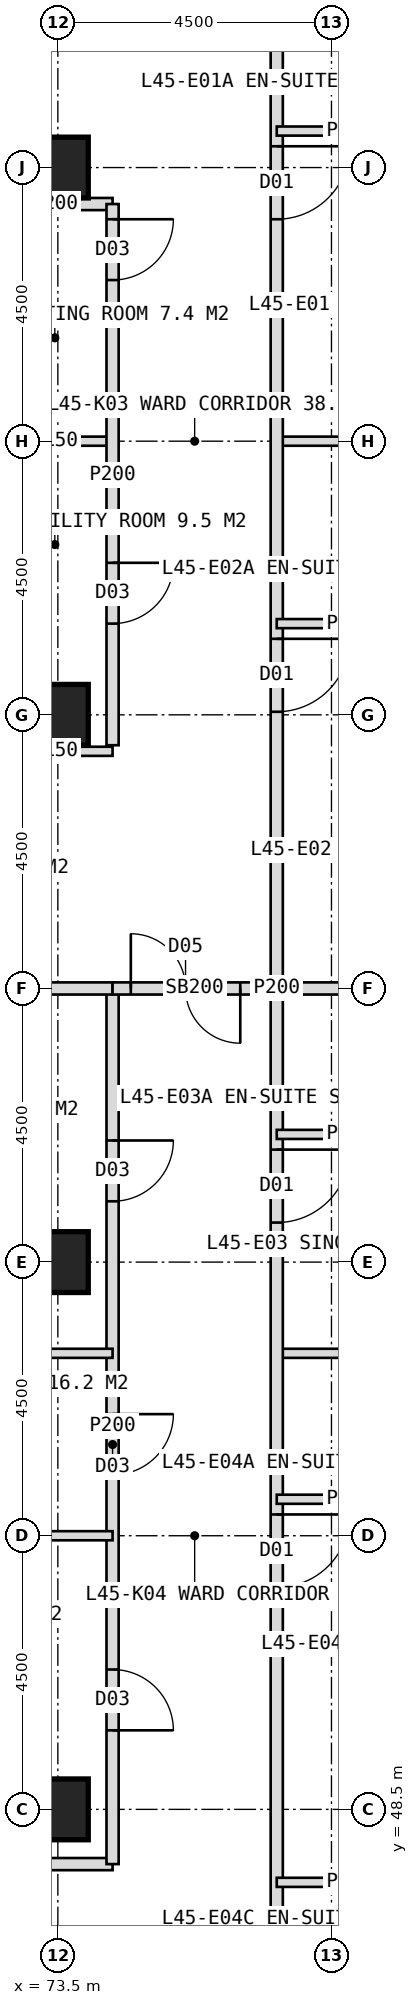
"""IFC4 building model, lengths in metres.
Left out: names, types, materials, properties, quantities, classifications, styles, units other than length and angle.
Written with IfcOpenShell. Run it as: python <this file> out.ifc"""

import sys

from ifc_helpers import new_model, si_unit, direction, frame, frame_2d, origin, origin_2d, place, context, subcontext, project, spatial, rectangle, hollow_rectangle, extrude, element, fill, save


model = new_model("IFC4")
c1 = context("Model", 3, precision=1e-05, world=origin(), true_north=direction((0.0, 1.0)))
c2 = subcontext(c1, "Body", "Model", "MODEL_VIEW")
j1 = project(units=[si_unit("LENGTHUNIT", "METRE"), si_unit("PLANEANGLEUNIT", "RADIAN")], contexts=[c1])
p1 = place(None, origin())
s1 = spatial("IfcSite", under=j1, at=p1, CompositionType="ELEMENT")
p2 = place(p1, origin())
s2 = spatial("IfcBuilding", under=s1, at=p2, CompositionType="ELEMENT")
p3 = place(p2, frame((0.0, 0.0, 189.0)))
s3 = spatial("IfcBuildingStorey", under=s2, at=p3, CompositionType="ELEMENT", Elevation=189.0)
for number, where, z_axis, x_axis in (
    (1, (73.5, 48.5, 0.0), (0.0, 0.0, 1.0), (1.0, 0.0, 0.0)),
    (2, (73.5, 75.5, 0.0), (0.0, 0.0, 1.0), (1.0, 0.0, 0.0)),
    (3, (73.5, 57.5, 0.0), (0.0, 0.0, 1.0), (1.0, 0.0, 0.0)),
    (4, (73.5, 66.5, 0.0), (0.0, 0.0, 1.0), (1.0, 0.0, 0.0)),
):
    element("IfcColumn", number, at=place(p3, frame(where, z_axis=z_axis, x_axis=x_axis)), inside=s3, PredefinedType="COLUMN", context=c2, shape_type="SweptSolid", body=[
        extrude(hollow_rectangle(XDim=1.0, YDim=1.0, WallThickness=0.1, at=origin_2d()), origin(), (0.0, 0.0, 1.0), 4.0),
    ])
p4 = place(p3, frame((72.5, 74.9, 0.0), z_axis=(0.0, 0.0, 1.0), x_axis=(1.0, 0.0, 0.0)))
e5 = element("IfcWall", 5, at=p4, inside=s3, PredefinedType="PARTITIONING", context=c2, shape_type="SweptSolid", body=[
    extrude(rectangle(XDim=1.9, YDim=0.2, at=frame_2d((0.95, 0.0))), origin(), (0.0, 0.0, 1.0), 3.75),
])
p5 = place(p3, frame((74.4, 47.6, 0.0), z_axis=(0.0, 0.0, 1.0), x_axis=(-1.0, 0.0, 0.0)))
e6 = element("IfcWall", 6, at=p5, inside=s3, PredefinedType="PARTITIONING", context=c2, shape_type="SweptSolid", body=[
    extrude(rectangle(XDim=5.4, YDim=0.2, at=frame_2d((2.7, 0.0))), origin(), (0.0, 0.0, 1.0), 3.75),
])
p6 = place(p3, frame((77.1, 71.0, 0.0), z_axis=(0.0, 0.0, 1.0), x_axis=(1.0, 0.0, 0.0)))
e7 = element("IfcWall", 7, at=p6, inside=s3, PredefinedType="PARTITIONING", context=c2, shape_type="SweptSolid", body=[
    extrude(rectangle(XDim=5.25, YDim=0.15, at=frame_2d((2.625, 0.0))), origin(), (0.0, 0.0, 1.0), 3.75),
])
p7 = place(p3, frame((77.1, 62.0, 0.0), z_axis=(0.0, 0.0, 1.0), x_axis=(1.0, 0.0, 0.0)))
e8 = element("IfcWall", 8, at=p7, inside=s3, PredefinedType="SOLIDWALL", context=c2, shape_type="SweptSolid", body=[
    extrude(rectangle(XDim=5.25, YDim=0.2, at=frame_2d((2.625, 0.0))), origin(), (0.0, 0.0, 1.0), 2.95),
])
p8 = place(p3, frame((77.1, 56.0, 0.0), z_axis=(0.0, 0.0, 1.0), x_axis=(1.0, 0.0, 0.0)))
e9 = element("IfcWall", 9, at=p8, inside=s3, PredefinedType="PARTITIONING", context=c2, shape_type="SweptSolid", body=[
    extrude(rectangle(XDim=5.25, YDim=0.15, at=frame_2d((2.625, 0.0))), origin(), (0.0, 0.0, 1.0), 3.75),
])
p9 = place(p3, frame((77.1, 79.1, 0.0), z_axis=(0.0, 0.0, 1.0), x_axis=(0.0, -1.0, 0.0)))
e10 = element("IfcWall", 10, at=p9, inside=s3, PredefinedType="PARTITIONING", context=c2, shape_type="SweptSolid", body=[
    extrude(rectangle(XDim=34.2, YDim=0.2, at=frame_2d((17.1, 0.0))), origin(), (0.0, 0.0, 1.0), 3.75),
])
p10 = place(p9, frame((3.25, 0.0, 0.0)))
e11 = element("IfcOpeningElement", 11, at=p10, cuts=e10, PredefinedType="OPENING", context=c2, shape_type="SweptSolid", body=[
    extrude(rectangle(XDim=1.2, YDim=2.2, at=frame_2d((0.6, 1.1))), frame((0.0, 0.11, 0.0), z_axis=(0.0, -1.0, 0.0), x_axis=(1.0, 0.0, 0.0)), (0.0, 0.0, 1.0), 0.22),
])
p11 = place(p9, frame((11.35, 0.0, 0.0)))
e12 = element("IfcOpeningElement", 12, at=p11, cuts=e10, PredefinedType="OPENING", context=c2, shape_type="SweptSolid", body=[
    extrude(rectangle(XDim=1.2, YDim=2.2, at=frame_2d((0.6, 1.1))), frame((0.0, 0.11, 0.0), z_axis=(0.0, -1.0, 0.0), x_axis=(1.0, 0.0, 0.0)), (0.0, 0.0, 1.0), 0.22),
])
p12 = place(p9, frame((19.75, 0.0, 0.0)))
e13 = element("IfcOpeningElement", 13, at=p12, cuts=e10, PredefinedType="OPENING", context=c2, shape_type="SweptSolid", body=[
    extrude(rectangle(XDim=1.2, YDim=2.2, at=frame_2d((0.6, 1.1))), frame((0.0, 0.11, 0.0), z_axis=(0.0, -1.0, 0.0), x_axis=(1.0, 0.0, 0.0)), (0.0, 0.0, 1.0), 0.22),
])
p13 = place(p9, frame((25.75, 0.0, 0.0)))
e14 = element("IfcOpeningElement", 14, at=p13, cuts=e10, PredefinedType="OPENING", context=c2, shape_type="SweptSolid", body=[
    extrude(rectangle(XDim=1.2, YDim=2.2, at=frame_2d((0.6, 1.1))), frame((0.0, 0.11, 0.0), z_axis=(0.0, -1.0, 0.0), x_axis=(1.0, 0.0, 0.0)), (0.0, 0.0, 1.0), 0.22),
])
for number, where, z_axis, x_axis in (
    (15, (77.1, 76.1, 0.0), (0.0, 0.0, 1.0), (1.0, 0.0, 0.0)),
    (16, (77.1, 68.0, 0.0), (0.0, 0.0, 1.0), (1.0, 0.0, 0.0)),
    (17, (77.1, 59.6, 0.0), (0.0, 0.0, 1.0), (1.0, 0.0, 0.0)),
    (18, (77.1, 53.6, 0.0), (0.0, 0.0, 1.0), (1.0, 0.0, 0.0)),
    (19, (77.1, 47.3, 0.0), (0.0, 0.0, 1.0), (1.0, 0.0, 0.0)),
):
    element("IfcWall", number, at=place(p3, frame(where, z_axis=z_axis, x_axis=x_axis)), inside=s3, PredefinedType="PARTITIONING", context=c2, shape_type="SweptSolid", body=[
        extrude(rectangle(XDim=2.4, YDim=0.15, at=frame_2d((1.2, 0.0))), origin(), (0.0, 0.0, 1.0), 3.75),
    ])
p14 = place(p3, frame((72.5, 71.0, 0.0), z_axis=(0.0, 0.0, 1.0), x_axis=(1.0, 0.0, 0.0)))
e20 = element("IfcWall", 20, at=p14, inside=s3, PredefinedType="PARTITIONING", context=c2, shape_type="SweptSolid", body=[
    extrude(rectangle(XDim=1.9, YDim=0.15, at=frame_2d((0.95, 0.0))), origin(), (0.0, 0.0, 1.0), 3.75),
])
p15 = place(p3, frame((74.4, 74.9, 0.0), z_axis=(0.0, 0.0, 1.0), x_axis=(0.0, -1.0, 0.0)))
e21 = element("IfcWall", 21, at=p15, inside=s3, PredefinedType="PARTITIONING", context=c2, shape_type="SweptSolid", body=[
    extrude(rectangle(XDim=8.9, YDim=0.2, at=frame_2d((4.45, 0.0))), origin(), (0.0, 0.0, 1.0), 3.75),
])
p16 = place(p15, frame((0.25, 0.0, 0.0)))
e22 = element("IfcOpeningElement", 22, at=p16, cuts=e21, PredefinedType="OPENING", context=c2, shape_type="SweptSolid", body=[
    extrude(rectangle(XDim=1.0, YDim=2.1, at=frame_2d((0.5, 1.05))), frame((0.0, 0.11, 0.0), z_axis=(0.0, -1.0, 0.0), x_axis=(1.0, 0.0, 0.0)), (0.0, 0.0, 1.0), 0.22),
])
p17 = place(p15, frame((5.9, 0.0, 0.0)))
e23 = element("IfcOpeningElement", 23, at=p17, cuts=e21, PredefinedType="OPENING", context=c2, shape_type="SweptSolid", body=[
    extrude(rectangle(XDim=1.0, YDim=2.1, at=frame_2d((0.5, 1.05))), frame((0.0, 0.11, 0.0), z_axis=(0.0, -1.0, 0.0), x_axis=(1.0, 0.0, 0.0)), (0.0, 0.0, 1.0), 0.22),
])
p18 = place(p3, frame((74.4, 62.0, 0.0), z_axis=(0.0, 0.0, 1.0), x_axis=(0.0, -1.0, 0.0)))
e24 = element("IfcWall", 24, at=p18, inside=s3, PredefinedType="PARTITIONING", context=c2, shape_type="SweptSolid", body=[
    extrude(rectangle(XDim=14.4, YDim=0.2, at=frame_2d((7.2, 0.0))), origin(), (0.0, 0.0, 1.0), 3.75),
])
p19 = place(p18, frame((2.5, 0.0, 0.0)))
e25 = element("IfcOpeningElement", 25, at=p19, cuts=e24, PredefinedType="OPENING", context=c2, shape_type="SweptSolid", body=[
    extrude(rectangle(XDim=1.0, YDim=2.1, at=frame_2d((0.5, 1.05))), frame((0.0, 0.11, 0.0), z_axis=(0.0, -1.0, 0.0), x_axis=(1.0, 0.0, 0.0)), (0.0, 0.0, 1.0), 0.22),
])
p20 = place(p18, frame((7.0, 0.0, 0.0)))
e26 = element("IfcOpeningElement", 26, at=p20, cuts=e24, PredefinedType="OPENING", context=c2, shape_type="SweptSolid", body=[
    extrude(rectangle(XDim=1.0, YDim=2.1, at=frame_2d((0.5, 1.05))), frame((0.0, 0.11, 0.0), z_axis=(0.0, -1.0, 0.0), x_axis=(1.0, 0.0, 0.0)), (0.0, 0.0, 1.0), 0.22),
])
p21 = place(p18, frame((11.2, 0.0, 0.0)))
e27 = element("IfcOpeningElement", 27, at=p21, cuts=e24, PredefinedType="OPENING", context=c2, shape_type="SweptSolid", body=[
    extrude(rectangle(XDim=1.0, YDim=2.1, at=frame_2d((0.5, 1.05))), frame((0.0, 0.11, 0.0), z_axis=(0.0, -1.0, 0.0), x_axis=(1.0, 0.0, 0.0)), (0.0, 0.0, 1.0), 0.22),
])
p22 = place(p3, frame((72.5, 65.9, 0.0), z_axis=(0.0, 0.0, 1.0), x_axis=(1.0, 0.0, 0.0)))
e28 = element("IfcWall", 28, at=p22, inside=s3, PredefinedType="PARTITIONING", context=c2, shape_type="SweptSolid", body=[
    extrude(rectangle(XDim=1.9, YDim=0.15, at=frame_2d((0.95, 0.0))), origin(), (0.0, 0.0, 1.0), 3.75),
])
p23 = place(p3, frame((69.0, 62.0, 0.0), z_axis=(0.0, 0.0, 1.0), x_axis=(1.0, 0.0, 0.0)))
e29 = element("IfcWall", 29, at=p23, inside=s3, PredefinedType="SOLIDWALL", context=c2, shape_type="SweptSolid", body=[
    extrude(rectangle(XDim=5.4, YDim=0.2, at=frame_2d((2.7, 0.0))), origin(), (0.0, 0.0, 1.0), 2.95),
])
for number, where, z_axis, x_axis in (
    (30, (69.0, 56.0, 0.0), (0.0, 0.0, 1.0), (1.0, 0.0, 0.0)),
    (31, (69.0, 53.0, 0.0), (0.0, 0.0, 1.0), (1.0, 0.0, 0.0)),
):
    element("IfcWall", number, at=place(p3, frame(where, z_axis=z_axis, x_axis=x_axis)), inside=s3, PredefinedType="PARTITIONING", context=c2, shape_type="SweptSolid", body=[
        extrude(rectangle(XDim=5.4, YDim=0.15, at=frame_2d((2.7, 0.0))), origin(), (0.0, 0.0, 1.0), 3.75),
    ])
p24 = place(p3, frame((74.4, 62.0, 0.0), z_axis=(0.0, 0.0, 1.0), x_axis=(1.0, 0.0, 0.0)))
e32 = element("IfcWall", 32, at=p24, inside=s3, PredefinedType="SOLIDWALL", context=c2, shape_type="SweptSolid", body=[
    extrude(rectangle(XDim=2.7, YDim=0.2, at=frame_2d((1.35, 0.0))), origin(), (0.0, 0.0, 1.0), 2.95),
])
p25 = place(p24, frame((0.3, 0.0, 0.0)))
e33 = element("IfcOpeningElement", 33, at=p25, cuts=e32, PredefinedType="OPENING", context=c2, shape_type="SweptSolid", body=[
    extrude(rectangle(XDim=1.8, YDim=2.2, at=frame_2d((0.9, 1.1))), frame((0.0, 0.11, 0.0), z_axis=(0.0, -1.0, 0.0), x_axis=(1.0, 0.0, 0.0)), (0.0, 0.0, 1.0), 0.22),
])
p26 = place(p16, origin())
e34 = element("IfcDoor", 34, at=p26, inside=s3, OperationType="SINGLE_SWING_LEFT", PredefinedType="DOOR", context=c2, shape_type="SweptSolid", body=[
    extrude(rectangle(XDim=1.0, YDim=2.1, at=frame_2d((0.5, 1.05))), frame((0.0, 0.025, 0.0), z_axis=(0.0, -1.0, 0.0), x_axis=(1.0, 0.0, 0.0)), (0.0, 0.0, 1.0), 0.05),
])
fill(e22, e34)
p27 = place(p10, origin())
e35 = element("IfcDoor", 35, at=p27, inside=s3, OperationType="SINGLE_SWING_LEFT", PredefinedType="DOOR", context=c2, shape_type="SweptSolid", body=[
    extrude(rectangle(XDim=1.2, YDim=2.2, at=frame_2d((0.6, 1.1))), frame((0.0, 0.025, 0.0), z_axis=(0.0, -1.0, 0.0), x_axis=(1.0, 0.0, 0.0)), (0.0, 0.0, 1.0), 0.05),
])
fill(e11, e35)
p28 = place(p11, origin())
e36 = element("IfcDoor", 36, at=p28, inside=s3, OperationType="SINGLE_SWING_LEFT", PredefinedType="DOOR", context=c2, shape_type="SweptSolid", body=[
    extrude(rectangle(XDim=1.2, YDim=2.2, at=frame_2d((0.6, 1.1))), frame((0.0, 0.025, 0.0), z_axis=(0.0, -1.0, 0.0), x_axis=(1.0, 0.0, 0.0)), (0.0, 0.0, 1.0), 0.05),
])
fill(e12, e36)
p29 = place(p12, origin())
e37 = element("IfcDoor", 37, at=p29, inside=s3, OperationType="SINGLE_SWING_LEFT", PredefinedType="DOOR", context=c2, shape_type="SweptSolid", body=[
    extrude(rectangle(XDim=1.2, YDim=2.2, at=frame_2d((0.6, 1.1))), frame((0.0, 0.025, 0.0), z_axis=(0.0, -1.0, 0.0), x_axis=(1.0, 0.0, 0.0)), (0.0, 0.0, 1.0), 0.05),
])
fill(e13, e37)
p30 = place(p13, origin())
e38 = element("IfcDoor", 38, at=p30, inside=s3, OperationType="SINGLE_SWING_LEFT", PredefinedType="DOOR", context=c2, shape_type="SweptSolid", body=[
    extrude(rectangle(XDim=1.2, YDim=2.2, at=frame_2d((0.6, 1.1))), frame((0.0, 0.025, 0.0), z_axis=(0.0, -1.0, 0.0), x_axis=(1.0, 0.0, 0.0)), (0.0, 0.0, 1.0), 0.05),
])
fill(e14, e38)
p31 = place(p17, origin())
e39 = element("IfcDoor", 39, at=p31, inside=s3, OperationType="SINGLE_SWING_LEFT", PredefinedType="DOOR", context=c2, shape_type="SweptSolid", body=[
    extrude(rectangle(XDim=1.0, YDim=2.1, at=frame_2d((0.5, 1.05))), frame((0.0, 0.025, 0.0), z_axis=(0.0, -1.0, 0.0), x_axis=(1.0, 0.0, 0.0)), (0.0, 0.0, 1.0), 0.05),
])
fill(e23, e39)
p32 = place(p19, origin())
e40 = element("IfcDoor", 40, at=p32, inside=s3, OperationType="SINGLE_SWING_LEFT", PredefinedType="DOOR", context=c2, shape_type="SweptSolid", body=[
    extrude(rectangle(XDim=1.0, YDim=2.1, at=frame_2d((0.5, 1.05))), frame((0.0, 0.025, 0.0), z_axis=(0.0, -1.0, 0.0), x_axis=(1.0, 0.0, 0.0)), (0.0, 0.0, 1.0), 0.05),
])
fill(e25, e40)
p33 = place(p20, origin())
e41 = element("IfcDoor", 41, at=p33, inside=s3, OperationType="SINGLE_SWING_LEFT", PredefinedType="DOOR", context=c2, shape_type="SweptSolid", body=[
    extrude(rectangle(XDim=1.0, YDim=2.1, at=frame_2d((0.5, 1.05))), frame((0.0, 0.025, 0.0), z_axis=(0.0, -1.0, 0.0), x_axis=(1.0, 0.0, 0.0)), (0.0, 0.0, 1.0), 0.05),
])
fill(e26, e41)
p34 = place(p21, origin())
e42 = element("IfcDoor", 42, at=p34, inside=s3, OperationType="SINGLE_SWING_RIGHT", PredefinedType="DOOR", context=c2, shape_type="SweptSolid", body=[
    extrude(rectangle(XDim=1.0, YDim=2.1, at=frame_2d((0.5, 1.05))), frame((0.0, 0.025, 0.0), z_axis=(0.0, -1.0, 0.0), x_axis=(1.0, 0.0, 0.0)), (0.0, 0.0, 1.0), 0.05),
])
fill(e27, e42)
p35 = place(p25, origin())
e43 = element("IfcDoor", 43, at=p35, inside=s3, OperationType="DOUBLE_DOOR_DOUBLE_SWING", PredefinedType="DOOR", context=c2, shape_type="SweptSolid", body=[
    extrude(rectangle(XDim=1.8, YDim=2.2, at=frame_2d((0.9, 1.1))), frame((0.0, 0.025, 0.0), z_axis=(0.0, -1.0, 0.0), x_axis=(1.0, 0.0, 0.0)), (0.0, 0.0, 1.0), 0.05),
])
fill(e33, e43)
save(model, sys.argv[1])
